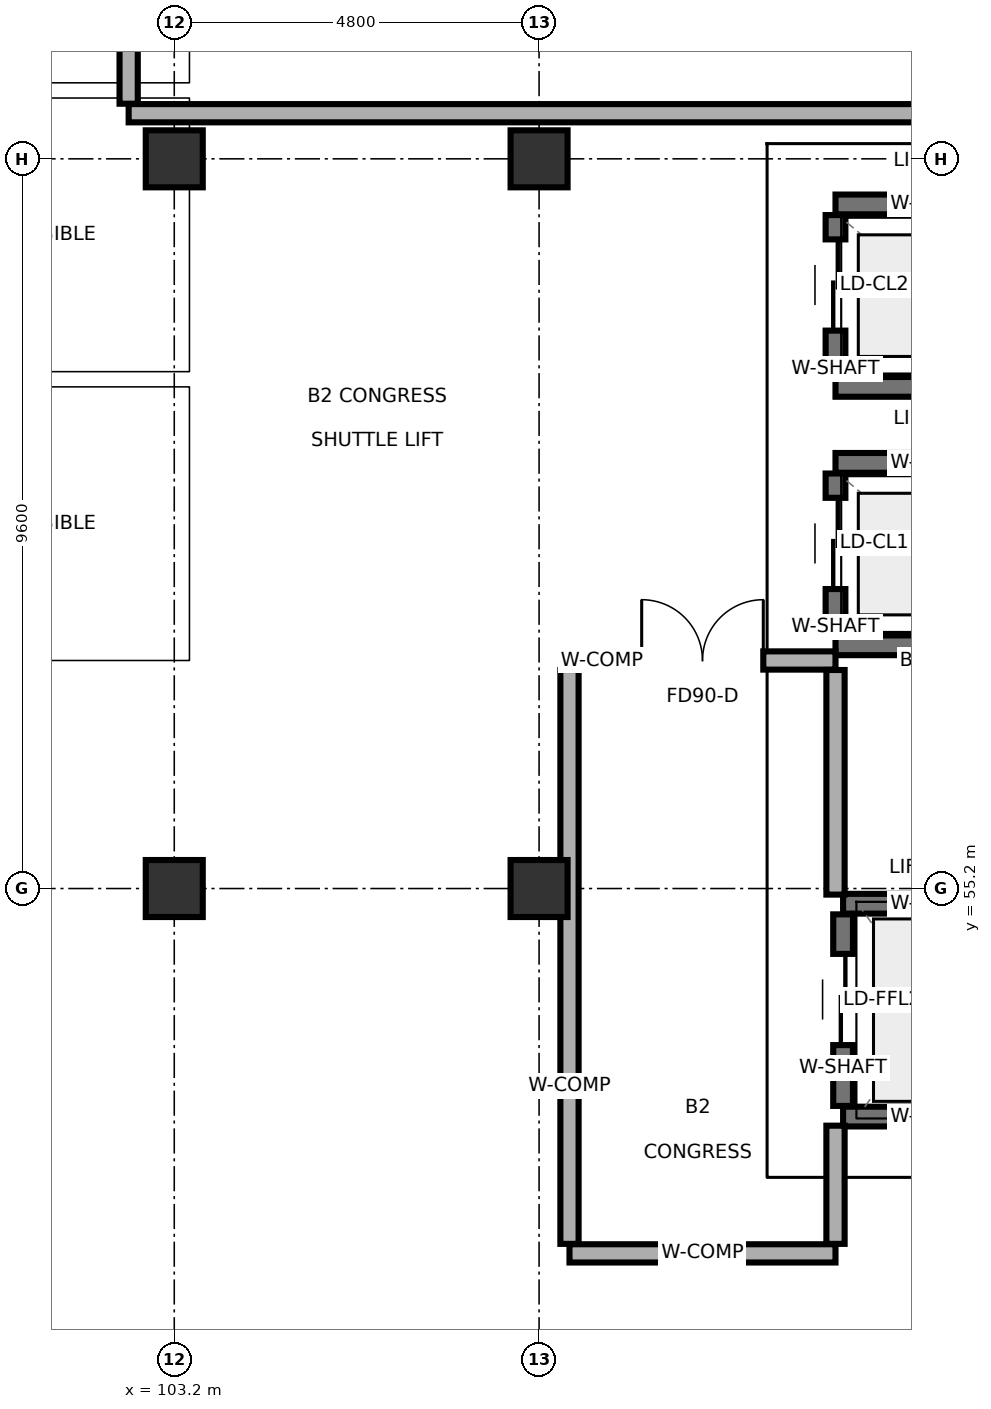
"""IFC4 building model, lengths in metres.
Left out: names, types, materials, properties, quantities, classifications, styles, units other than length and angle.
Written with IfcOpenShell. Run it as: python <this file> out.ifc"""

import sys

from ifc_helpers import new_model, si_unit, direction, frame, frame_2d, origin, origin_2d, place, context, subcontext, project, spatial, rectangle, extrude, element, fill, save


model = new_model("IFC4")
c1 = context("Model", 3, precision=1e-05, world=origin(), true_north=direction((0.0, 1.0)))
c2 = subcontext(c1, "Body", "Model", "MODEL_VIEW")
j1 = project(units=[si_unit("LENGTHUNIT", "METRE"), si_unit("PLANEANGLEUNIT", "RADIAN")], contexts=[c1])
p1 = place(None, origin())
s1 = spatial("IfcSite", under=j1, at=p1, CompositionType="ELEMENT")
p2 = place(p1, origin())
s2 = spatial("IfcBuilding", under=s1, at=p2, CompositionType="ELEMENT")
p3 = place(p2, frame((0.0, 0.0, -8.4)))
s3 = spatial("IfcBuildingStorey", under=s2, at=p3, CompositionType="ELEMENT", Elevation=-8.4)
for number, where, z_axis, x_axis in (
    (1, (103.2, 55.2, 0.0), (0.0, 0.0, 1.0), (1.0, 0.0, 0.0)),
    (2, (103.2, 64.8, 0.0), (0.0, 0.0, 1.0), (1.0, 0.0, 0.0)),
    (3, (108.0, 55.2, 0.0), (0.0, 0.0, 1.0), (1.0, 0.0, 0.0)),
    (4, (108.0, 64.8, 0.0), (0.0, 0.0, 1.0), (1.0, 0.0, 0.0)),
):
    element("IfcColumn", number, at=place(p3, frame(where, z_axis=z_axis, x_axis=x_axis)), inside=s3, PredefinedType="COLUMN", context=c2, shape_type="SweptSolid", body=[
        extrude(rectangle(XDim=0.75, YDim=0.75, at=origin_2d()), origin(), (0.0, 0.0, 1.0), 4.2),
    ])
for number, where, z_axis, x_axis in (
    (5, (112.0, 52.2, -0.95), (0.0, 0.0, 1.0), (1.0, 0.0, 0.0)),
    (6, (112.0, 55.0, -0.95), (0.0, 0.0, 1.0), (1.0, 0.0, 0.0)),
):
    element("IfcWall", number, at=place(p3, frame(where, z_axis=z_axis, x_axis=x_axis)), inside=s3, PredefinedType="SHEAR", context=c2, shape_type="SweptSolid", body=[
        extrude(rectangle(XDim=2.4, YDim=0.26, at=frame_2d((1.2, 0.0))), origin(), (0.0, 0.0, 1.0), 4.425),
    ])
p4 = place(p3, frame((112.0, 52.34, -0.95), z_axis=(0.0, 0.0, 1.0), x_axis=(0.0, 1.0, 0.0)))
e7 = element("IfcWall", 7, at=p4, inside=s3, PredefinedType="SHEAR", context=c2, shape_type="SweptSolid", body=[
    extrude(rectangle(XDim=2.52, YDim=0.26, at=frame_2d((1.26, 0.0))), origin(), (0.0, 0.0, 1.0), 4.425),
])
p5 = place(p4, frame((0.8, 0.0, 0.95)))
e8 = element("IfcOpeningElement", 8, at=p5, cuts=e7, PredefinedType="OPENING", context=c2, shape_type="SweptSolid", body=[
    extrude(rectangle(XDim=1.2, YDim=2.2, at=frame_2d((0.6, 1.1))), frame((0.0, 0.14, 0.0), z_axis=(0.0, -1.0, 0.0), x_axis=(1.0, 0.0, 0.0)), (0.0, 0.0, 1.0), 0.28),
])
for number, where, z_axis, x_axis in (
    (9, (111.9, 58.4, -0.95), (0.0, 0.0, 1.0), (1.0, 0.0, 0.0)),
    (10, (111.9, 60.8, -0.95), (0.0, 0.0, 1.0), (1.0, 0.0, 0.0)),
):
    element("IfcWall", number, at=place(p3, frame(where, z_axis=z_axis, x_axis=x_axis)), inside=s3, PredefinedType="SHEAR", context=c2, shape_type="SweptSolid", body=[
        extrude(rectangle(XDim=2.6, YDim=0.26, at=frame_2d((1.3, 0.0))), origin(), (0.0, 0.0, 1.0), 4.88),
    ])
p6 = place(p3, frame((111.9, 58.54, -0.95), z_axis=(0.0, 0.0, 1.0), x_axis=(0.0, 1.0, 0.0)))
e11 = element("IfcWall", 11, at=p6, inside=s3, PredefinedType="SHEAR", context=c2, shape_type="SweptSolid", body=[
    extrude(rectangle(XDim=2.12, YDim=0.26, at=frame_2d((1.06, 0.0))), origin(), (0.0, 0.0, 1.0), 4.88),
])
p7 = place(p6, frame((0.6, 0.0, 0.95)))
e12 = element("IfcOpeningElement", 12, at=p7, cuts=e11, PredefinedType="OPENING", context=c2, shape_type="SweptSolid", body=[
    extrude(rectangle(XDim=1.2, YDim=2.2, at=frame_2d((0.6, 1.1))), frame((0.0, 0.14, 0.0), z_axis=(0.0, -1.0, 0.0), x_axis=(1.0, 0.0, 0.0)), (0.0, 0.0, 1.0), 0.28),
])
for number, where, z_axis, x_axis in (
    (13, (111.9, 61.8, -0.95), (0.0, 0.0, 1.0), (1.0, 0.0, 0.0)),
    (14, (111.9, 64.2, -0.95), (0.0, 0.0, 1.0), (1.0, 0.0, 0.0)),
):
    element("IfcWall", number, at=place(p3, frame(where, z_axis=z_axis, x_axis=x_axis)), inside=s3, PredefinedType="SHEAR", context=c2, shape_type="SweptSolid", body=[
        extrude(rectangle(XDim=2.6, YDim=0.26, at=frame_2d((1.3, 0.0))), origin(), (0.0, 0.0, 1.0), 4.88),
    ])
p8 = place(p3, frame((111.9, 61.94, -0.95), z_axis=(0.0, 0.0, 1.0), x_axis=(0.0, 1.0, 0.0)))
e15 = element("IfcWall", 15, at=p8, inside=s3, PredefinedType="SHEAR", context=c2, shape_type="SweptSolid", body=[
    extrude(rectangle(XDim=2.12, YDim=0.26, at=frame_2d((1.06, 0.0))), origin(), (0.0, 0.0, 1.0), 4.88),
])
p9 = place(p8, frame((0.6, 0.0, 0.95)))
e16 = element("IfcOpeningElement", 16, at=p9, cuts=e15, PredefinedType="OPENING", context=c2, shape_type="SweptSolid", body=[
    extrude(rectangle(XDim=1.2, YDim=2.2, at=frame_2d((0.6, 1.1))), frame((0.0, 0.14, 0.0), z_axis=(0.0, -1.0, 0.0), x_axis=(1.0, 0.0, 0.0)), (0.0, 0.0, 1.0), 0.28),
])
p10 = place(p3, frame((108.4, 50.4, 0.0), z_axis=(0.0, 0.0, 1.0), x_axis=(1.0, 0.0, 0.0)))
e17 = element("IfcWall", 17, at=p10, inside=s3, PredefinedType="SOLIDWALL", context=c2, shape_type="SweptSolid", body=[
    extrude(rectangle(XDim=3.5, YDim=0.24, at=frame_2d((1.75, 0.0))), origin(), (0.0, 0.0, 1.0), 3.93),
])
p11 = place(p3, frame((108.4, 50.525, 0.0), z_axis=(0.0, 0.0, 1.0), x_axis=(0.0, 1.0, 0.0)))
e18 = element("IfcWall", 18, at=p11, inside=s3, PredefinedType="SOLIDWALL", context=c2, shape_type="SweptSolid", body=[
    extrude(rectangle(XDim=7.55, YDim=0.24, at=frame_2d((3.775, 0.0))), origin(), (0.0, 0.0, 1.0), 3.475),
])
p12 = place(p3, frame((108.4, 58.2, 0.0), z_axis=(0.0, 0.0, 1.0), x_axis=(1.0, 0.0, 0.0)))
e19 = element("IfcWall", 19, at=p12, inside=s3, PredefinedType="SOLIDWALL", context=c2, shape_type="SweptSolid", body=[
    extrude(rectangle(XDim=3.5, YDim=0.24, at=frame_2d((1.75, 0.0))), origin(), (0.0, 0.0, 1.0), 3.93),
])
p13 = place(p12, frame((0.95, 0.0, 0.0)))
e20 = element("IfcOpeningElement", 20, at=p13, cuts=e19, PredefinedType="OPENING", context=c2, shape_type="SweptSolid", body=[
    extrude(rectangle(XDim=1.6, YDim=2.2, at=frame_2d((0.8, 1.1))), frame((0.0, 0.13, 0.0), z_axis=(0.0, -1.0, 0.0), x_axis=(1.0, 0.0, 0.0)), (0.0, 0.0, 1.0), 0.26),
])
p14 = place(p3, frame((111.9, 50.525, 0.0), z_axis=(0.0, 0.0, 1.0), x_axis=(0.0, 1.0, 0.0)))
e21 = element("IfcWall", 21, at=p14, inside=s3, PredefinedType="SOLIDWALL", context=c2, shape_type="SweptSolid", body=[
    extrude(rectangle(XDim=1.555, YDim=0.24, at=frame_2d((0.778, 0.0))), origin(), (0.0, 0.0, 1.0), 3.93),
])
p15 = place(p3, frame((111.9, 55.12, 0.0), z_axis=(0.0, 0.0, 1.0), x_axis=(0.0, 1.0, 0.0)))
e22 = element("IfcWall", 22, at=p15, inside=s3, PredefinedType="SOLIDWALL", context=c2, shape_type="SweptSolid", body=[
    extrude(rectangle(XDim=2.955, YDim=0.24, at=frame_2d((1.478, 0.0))), origin(), (0.0, 0.0, 1.0), 3.475),
])
p16 = place(p3, frame((102.6, 65.4, 0.0), z_axis=(0.0, 0.0, 1.0), x_axis=(1.0, 0.0, 0.0)))
e23 = element("IfcWall", 23, at=p16, inside=s3, PredefinedType="SOLIDWALL", context=c2, shape_type="SweptSolid", body=[
    extrude(rectangle(XDim=14.75, YDim=0.24, at=frame_2d((7.375, 0.0))), origin(), (0.0, 0.0, 1.0), 3.415),
])
p17 = place(p3, frame((102.6, 65.525, 0.0), z_axis=(0.0, 0.0, 1.0), x_axis=(0.0, 1.0, 0.0)))
e24 = element("IfcWall", 24, at=p17, inside=s3, PredefinedType="SOLIDWALL", context=c2, shape_type="SweptSolid", body=[
    extrude(rectangle(XDim=12.15, YDim=0.24, at=frame_2d((6.075, 0.0))), origin(), (0.0, 0.0, 1.0), 3.93),
])
p18 = place(p17, frame((5.425, 0.0, 0.0)))
e25 = element("IfcOpeningElement", 25, at=p18, cuts=e24, PredefinedType="OPENING", context=c2, shape_type="SweptSolid", body=[
    extrude(rectangle(XDim=1.3, YDim=2.2, at=frame_2d((0.65, 1.1))), frame((0.0, 0.13, 0.0), z_axis=(0.0, -1.0, 0.0), x_axis=(1.0, 0.0, 0.0)), (0.0, 0.0, 1.0), 0.26),
])
p19 = place(p5, origin())
e26 = element("IfcDoor", 26, at=p19, inside=s3, OperationType="SLIDING_TO_LEFT", PredefinedType="DOOR", context=c2, shape_type="SweptSolid", body=[
    extrude(rectangle(XDim=1.2, YDim=2.2, at=frame_2d((0.6, 1.1))), frame((0.0, 0.025, 0.0), z_axis=(0.0, -1.0, 0.0), x_axis=(1.0, 0.0, 0.0)), (0.0, 0.0, 1.0), 0.05),
])
fill(e8, e26)
p20 = place(p7, origin())
e27 = element("IfcDoor", 27, at=p20, inside=s3, OperationType="SLIDING_TO_RIGHT", PredefinedType="DOOR", context=c2, shape_type="SweptSolid", body=[
    extrude(rectangle(XDim=1.2, YDim=2.2, at=frame_2d((0.6, 1.1))), frame((0.0, 0.025, 0.0), z_axis=(0.0, -1.0, 0.0), x_axis=(1.0, 0.0, 0.0)), (0.0, 0.0, 1.0), 0.05),
])
fill(e12, e27)
p21 = place(p9, origin())
e28 = element("IfcDoor", 28, at=p21, inside=s3, OperationType="SLIDING_TO_LEFT", PredefinedType="DOOR", context=c2, shape_type="SweptSolid", body=[
    extrude(rectangle(XDim=1.2, YDim=2.2, at=frame_2d((0.6, 1.1))), frame((0.0, 0.025, 0.0), z_axis=(0.0, -1.0, 0.0), x_axis=(1.0, 0.0, 0.0)), (0.0, 0.0, 1.0), 0.05),
])
fill(e16, e28)
p22 = place(p13, origin())
e29 = element("IfcDoor", 29, at=p22, inside=s3, OperationType="DOUBLE_DOOR_SINGLE_SWING", PredefinedType="DOOR", context=c2, shape_type="SweptSolid", body=[
    extrude(rectangle(XDim=1.6, YDim=2.2, at=frame_2d((0.8, 1.1))), frame((0.0, 0.025, 0.0), z_axis=(0.0, -1.0, 0.0), x_axis=(1.0, 0.0, 0.0)), (0.0, 0.0, 1.0), 0.05),
])
fill(e20, e29)
save(model, sys.argv[1])
